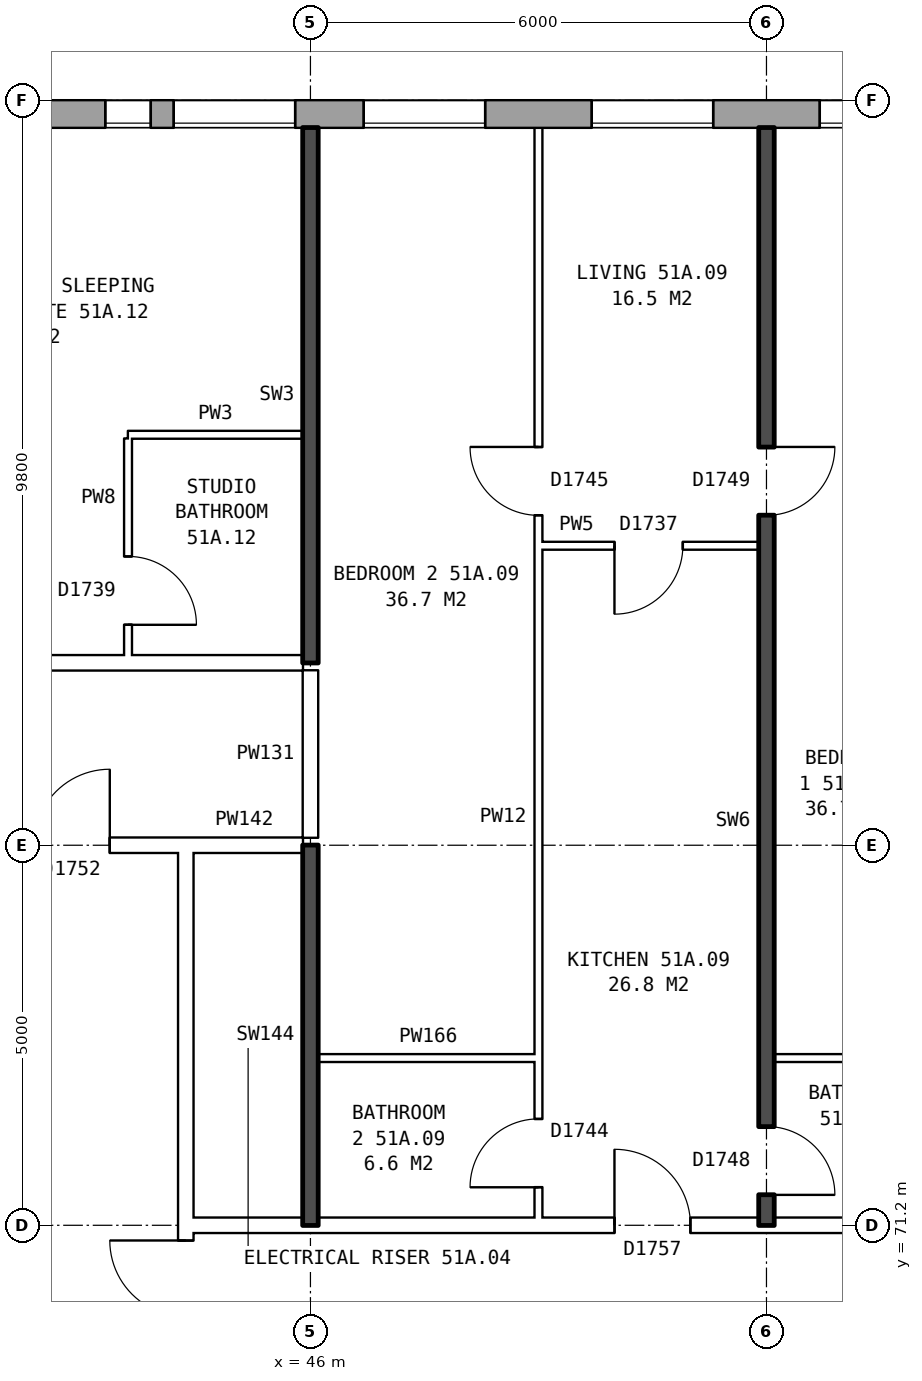
"""IFC4 building model, lengths in metres.
Left out: names, types, materials, properties, quantities, classifications, styles, units other than length and angle.
Written with IfcOpenShell. Run it as: python <this file> out.ifc"""

import sys

from ifc_helpers import new_model, si_unit, direction, frame, frame_2d, origin, place, context, subcontext, project, spatial, rectangle, extrude, element, fill, save


model = new_model("IFC4")
c1 = context("Model", 3, precision=1e-05, world=origin(), true_north=direction((0.0, 1.0)))
c2 = subcontext(c1, "Body", "Model", "MODEL_VIEW")
j1 = project(units=[si_unit("LENGTHUNIT", "METRE"), si_unit("PLANEANGLEUNIT", "RADIAN")], contexts=[c1])
p1 = place(None, origin())
s1 = spatial("IfcSite", under=j1, at=p1, CompositionType="ELEMENT")
p2 = place(p1, origin())
s2 = spatial("IfcBuilding", under=s1, at=p2, CompositionType="ELEMENT")
p3 = place(p2, frame((0.0, 0.0, 182.0)))
s3 = spatial("IfcBuildingStorey", under=s2, at=p3, CompositionType="ELEMENT", Elevation=182.0)
p4 = place(p3, frame((72.925, 85.82, 0.0), z_axis=(0.0, 0.0, 1.0), x_axis=(-1.0, 0.0, 0.0)))
e1 = element("IfcWall", 1, at=p4, inside=s3, PredefinedType="STANDARD", context=c2, shape_type="SweptSolid", body=[
    extrude(rectangle(XDim=39.601, YDim=0.36, at=frame_2d((19.8, 0.0))), origin(), (0.0, 0.0, 1.0), 2.85),
])
p5 = place(p4, frame((0.625, 0.0, 0.8)))
e2 = element("IfcOpeningElement", 2, at=p5, cuts=e1, PredefinedType="OPENING", context=c2, shape_type="SweptSolid", body=[
    extrude(rectangle(XDim=1.6, YDim=1.8, at=frame_2d((0.8, 0.9))), frame((0.0, 0.19, 0.0), z_axis=(0.0, -1.0, 0.0), x_axis=(1.0, 0.0, 0.0)), (0.0, 0.0, 1.0), 0.38),
])
p6 = place(p4, frame((3.625, 0.0, 0.8)))
e3 = element("IfcOpeningElement", 3, at=p6, cuts=e1, PredefinedType="OPENING", context=c2, shape_type="SweptSolid", body=[
    extrude(rectangle(XDim=1.6, YDim=1.8, at=frame_2d((0.8, 0.9))), frame((0.0, 0.19, 0.0), z_axis=(0.0, -1.0, 0.0), x_axis=(1.0, 0.0, 0.0)), (0.0, 0.0, 1.0), 0.38),
])
p7 = place(p4, frame((6.625, 0.0, 0.8)))
e4 = element("IfcOpeningElement", 4, at=p7, cuts=e1, PredefinedType="OPENING", context=c2, shape_type="SweptSolid", body=[
    extrude(rectangle(XDim=1.6, YDim=1.8, at=frame_2d((0.8, 0.9))), frame((0.0, 0.19, 0.0), z_axis=(0.0, -1.0, 0.0), x_axis=(1.0, 0.0, 0.0)), (0.0, 0.0, 1.0), 0.38),
])
p8 = place(p4, frame((9.475, 0.0, 0.35)))
e5 = element("IfcOpeningElement", 5, at=p8, cuts=e1, PredefinedType="OPENING", context=c2, shape_type="SweptSolid", body=[
    extrude(rectangle(XDim=0.6, YDim=0.9, at=frame_2d((0.3, 0.45))), frame((0.0, 0.19, 0.0), z_axis=(0.0, -1.0, 0.0), x_axis=(1.0, 0.0, 0.0)), (0.0, 0.0, 1.0), 0.38),
])
p9 = place(p4, frame((12.625, 0.0, 0.8)))
e6 = element("IfcOpeningElement", 6, at=p9, cuts=e1, PredefinedType="OPENING", context=c2, shape_type="SweptSolid", body=[
    extrude(rectangle(XDim=1.6, YDim=1.8, at=frame_2d((0.8, 0.9))), frame((0.0, 0.19, 0.0), z_axis=(0.0, -1.0, 0.0), x_axis=(1.0, 0.0, 0.0)), (0.0, 0.0, 1.0), 0.38),
])
p10 = place(p4, frame((15.625, 0.0, 0.8)))
e7 = element("IfcOpeningElement", 7, at=p10, cuts=e1, PredefinedType="OPENING", context=c2, shape_type="SweptSolid", body=[
    extrude(rectangle(XDim=1.6, YDim=1.8, at=frame_2d((0.8, 0.9))), frame((0.0, 0.19, 0.0), z_axis=(0.0, -1.0, 0.0), x_axis=(1.0, 0.0, 0.0)), (0.0, 0.0, 1.0), 0.38),
])
p11 = place(p4, frame((18.625, 0.0, 0.8)))
e8 = element("IfcOpeningElement", 8, at=p11, cuts=e1, PredefinedType="OPENING", context=c2, shape_type="SweptSolid", body=[
    extrude(rectangle(XDim=1.6, YDim=1.8, at=frame_2d((0.8, 0.9))), frame((0.0, 0.19, 0.0), z_axis=(0.0, -1.0, 0.0), x_axis=(1.0, 0.0, 0.0)), (0.0, 0.0, 1.0), 0.38),
])
p12 = place(p4, frame((21.625, 0.0, 0.8)))
e9 = element("IfcOpeningElement", 9, at=p12, cuts=e1, PredefinedType="OPENING", context=c2, shape_type="SweptSolid", body=[
    extrude(rectangle(XDim=1.6, YDim=1.8, at=frame_2d((0.8, 0.9))), frame((0.0, 0.19, 0.0), z_axis=(0.0, -1.0, 0.0), x_axis=(1.0, 0.0, 0.0)), (0.0, 0.0, 1.0), 0.38),
])
p13 = place(p4, frame((24.625, 0.0, 0.8)))
e10 = element("IfcOpeningElement", 10, at=p13, cuts=e1, PredefinedType="OPENING", context=c2, shape_type="SweptSolid", body=[
    extrude(rectangle(XDim=1.6, YDim=1.8, at=frame_2d((0.8, 0.9))), frame((0.0, 0.19, 0.0), z_axis=(0.0, -1.0, 0.0), x_axis=(1.0, 0.0, 0.0)), (0.0, 0.0, 1.0), 0.38),
])
p14 = place(p4, frame((27.125, 0.0, 0.8)))
e11 = element("IfcOpeningElement", 11, at=p14, cuts=e1, PredefinedType="OPENING", context=c2, shape_type="SweptSolid", body=[
    extrude(rectangle(XDim=1.6, YDim=1.8, at=frame_2d((0.8, 0.9))), frame((0.0, 0.19, 0.0), z_axis=(0.0, -1.0, 0.0), x_axis=(1.0, 0.0, 0.0)), (0.0, 0.0, 1.0), 0.38),
])
p15 = place(p4, frame((29.025, 0.0, 0.8)))
e12 = element("IfcOpeningElement", 12, at=p15, cuts=e1, PredefinedType="OPENING", context=c2, shape_type="SweptSolid", body=[
    extrude(rectangle(XDim=0.6, YDim=0.9, at=frame_2d((0.3, 0.45))), frame((0.0, 0.19, 0.0), z_axis=(0.0, -1.0, 0.0), x_axis=(1.0, 0.0, 0.0)), (0.0, 0.0, 1.0), 0.38),
])
p16 = place(p4, frame((33.625, 0.0, 0.8)))
e13 = element("IfcOpeningElement", 13, at=p16, cuts=e1, PredefinedType="OPENING", context=c2, shape_type="SweptSolid", body=[
    extrude(rectangle(XDim=1.6, YDim=1.8, at=frame_2d((0.8, 0.9))), frame((0.0, 0.19, 0.0), z_axis=(0.0, -1.0, 0.0), x_axis=(1.0, 0.0, 0.0)), (0.0, 0.0, 1.0), 0.38),
])
p17 = place(p4, frame((36.625, 0.0, 0.8)))
e14 = element("IfcOpeningElement", 14, at=p17, cuts=e1, PredefinedType="OPENING", context=c2, shape_type="SweptSolid", body=[
    extrude(rectangle(XDim=1.6, YDim=1.8, at=frame_2d((0.8, 0.9))), frame((0.0, 0.19, 0.0), z_axis=(0.0, -1.0, 0.0), x_axis=(1.0, 0.0, 0.0)), (0.0, 0.0, 1.0), 0.38),
])
p18 = place(p4, frame((10.375, 0.0, 0.35)))
e15 = element("IfcOpeningElement", 15, at=p18, cuts=e1, PredefinedType="OPENING", context=c2, shape_type="SweptSolid", body=[
    extrude(rectangle(XDim=1.4, YDim=1.8, at=frame_2d((0.7, 0.9))), frame((0.0, 0.19, 0.0), z_axis=(0.0, -1.0, 0.0), x_axis=(1.0, 0.0, 0.0)), (0.0, 0.0, 1.0), 0.38),
])
p19 = place(p4, frame((30.775, 0.0, 1.7)))
e16 = element("IfcOpeningElement", 16, at=p19, cuts=e1, PredefinedType="OPENING", context=c2, shape_type="SweptSolid", body=[
    extrude(rectangle(XDim=0.6, YDim=0.9, at=frame_2d((0.3, 0.45))), frame((0.0, 0.19, 0.0), z_axis=(0.0, -1.0, 0.0), x_axis=(1.0, 0.0, 0.0)), (0.0, 0.0, 1.0), 0.38),
])
p20 = place(p4, frame((31.675, 0.0, 0.8)))
e17 = element("IfcOpeningElement", 17, at=p20, cuts=e1, PredefinedType="OPENING", context=c2, shape_type="SweptSolid", body=[
    extrude(rectangle(XDim=1.0, YDim=1.8, at=frame_2d((0.5, 0.9))), frame((0.0, 0.19, 0.0), z_axis=(0.0, -1.0, 0.0), x_axis=(1.0, 0.0, 0.0)), (0.0, 0.0, 1.0), 0.38),
])
p21 = place(p3, frame((44.36, 63.9, 0.0), z_axis=(0.0, 0.0, 1.0), x_axis=(0.0, 1.0, 0.0)))
e18 = element("IfcWall", 18, at=p21, inside=s3, PredefinedType="PARTITIONING", context=c2, shape_type="SweptSolid", body=[
    extrude(rectangle(XDim=12.2, YDim=0.2, at=frame_2d((6.1, 0.0))), origin(), (0.0, 0.0, 1.0), 2.85),
])
p22 = place(p21, frame((5.1, 0.0, 0.0)))
e19 = element("IfcOpeningElement", 19, at=p22, cuts=e18, PredefinedType="OPENING", context=c2, shape_type="SweptSolid", body=[
    extrude(rectangle(XDim=2.0, YDim=2.1, at=frame_2d((1.0, 1.05))), frame((0.0, 0.11, 0.0), z_axis=(0.0, -1.0, 0.0), x_axis=(1.0, 0.0, 0.0)), (0.0, 0.0, 1.0), 0.22),
])
p23 = place(p3, frame((44.36, 71.2, 0.0), z_axis=(0.0, 0.0, 1.0), x_axis=(1.0, 0.0, 0.0)))
e20 = element("IfcWall", 20, at=p23, inside=s3, PredefinedType="PARTITIONING", context=c2, shape_type="SweptSolid", body=[
    extrude(rectangle(XDim=19.28, YDim=0.2, at=frame_2d((9.64, 0.0))), origin(), (0.0, 0.0, 1.0), 2.85),
])
p24 = place(p23, frame((14.64, 0.0, 0.0)))
e21 = element("IfcOpeningElement", 21, at=p24, cuts=e20, PredefinedType="OPENING", context=c2, shape_type="SweptSolid", body=[
    extrude(rectangle(XDim=1.0, YDim=2.1, at=frame_2d((0.5, 1.05))), frame((0.0, 0.11, 0.0), z_axis=(0.0, -1.0, 0.0), x_axis=(1.0, 0.0, 0.0)), (0.0, 0.0, 1.0), 0.22),
])
p25 = place(p23, frame((5.64, 0.0, 0.0)))
e22 = element("IfcOpeningElement", 22, at=p25, cuts=e20, PredefinedType="OPENING", context=c2, shape_type="SweptSolid", body=[
    extrude(rectangle(XDim=1.0, YDim=2.1, at=frame_2d((0.5, 1.05))), frame((0.0, 0.11, 0.0), z_axis=(0.0, -1.0, 0.0), x_axis=(1.0, 0.0, 0.0)), (0.0, 0.0, 1.0), 0.22),
])
p26 = place(p3, frame((46.1, 73.4, 0.0), z_axis=(0.0, 0.0, 1.0), x_axis=(1.0, 0.0, 0.0)))
e23 = element("IfcWall", 23, at=p26, inside=s3, PredefinedType="PARTITIONING", context=c2, shape_type="SweptSolid", body=[
    extrude(rectangle(XDim=2.9, YDim=0.1, at=frame_2d((1.45, 0.0))), origin(), (0.0, 0.0, 1.0), 2.85),
])
p27 = place(p3, frame((52.1, 73.4, 0.0), z_axis=(0.0, 0.0, 1.0), x_axis=(1.0, 0.0, 0.0)))
e24 = element("IfcWall", 24, at=p27, inside=s3, PredefinedType="PARTITIONING", context=c2, shape_type="SweptSolid", body=[
    extrude(rectangle(XDim=2.8, YDim=0.1, at=frame_2d((1.4, 0.0))), origin(), (0.0, 0.0, 1.0), 2.85),
])
p28 = place(p3, frame((41.36, 76.2, 0.0), z_axis=(0.0, 0.0, 1.0), x_axis=(1.0, 0.0, 0.0)))
e25 = element("IfcWall", 25, at=p28, inside=s3, PredefinedType="PARTITIONING", context=c2, shape_type="SweptSolid", body=[
    extrude(rectangle(XDim=3.0, YDim=0.2, at=frame_2d((1.5, 0.0))), origin(), (0.0, 0.0, 1.0), 2.85),
])
p29 = place(p28, frame((1.0, 0.0, 0.0)))
e26 = element("IfcOpeningElement", 26, at=p29, cuts=e25, PredefinedType="OPENING", context=c2, shape_type="SweptSolid", body=[
    extrude(rectangle(XDim=1.0, YDim=2.1, at=frame_2d((0.5, 1.05))), frame((0.0, 0.11, 0.0), z_axis=(0.0, -1.0, 0.0), x_axis=(1.0, 0.0, 0.0)), (0.0, 0.0, 1.0), 0.22),
])
p30 = place(p3, frame((44.36, 76.2, 0.0), z_axis=(0.0, 0.0, 1.0), x_axis=(1.0, 0.0, 0.0)))
e27 = element("IfcWall", 27, at=p30, inside=s3, PredefinedType="PARTITIONING", context=c2, shape_type="SweptSolid", body=[
    extrude(rectangle(XDim=1.54, YDim=0.2, at=frame_2d((0.77, 0.0))), origin(), (0.0, 0.0, 1.0), 2.85),
])
p31 = place(p3, frame((30.61, 78.6, 0.0), z_axis=(0.0, 0.0, 1.0), x_axis=(1.0, 0.0, 0.0)))
e28 = element("IfcWall", 28, at=p31, inside=s3, PredefinedType="PARTITIONING", context=c2, shape_type="SweptSolid", body=[
    extrude(rectangle(XDim=15.29, YDim=0.2, at=frame_2d((7.645, 0.0))), origin(), (0.0, 0.0, 1.0), 2.85),
])
p32 = place(p31, frame((10.69, 0.0, 0.0)))
e29 = element("IfcOpeningElement", 29, at=p32, cuts=e28, PredefinedType="OPENING", context=c2, shape_type="SweptSolid", body=[
    extrude(rectangle(XDim=1.0, YDim=2.1, at=frame_2d((0.5, 1.05))), frame((0.0, 0.11, 0.0), z_axis=(0.0, -1.0, 0.0), x_axis=(1.0, 0.0, 0.0)), (0.0, 0.0, 1.0), 0.22),
])
p33 = place(p31, frame((5.89, 0.0, 0.0)))
e30 = element("IfcOpeningElement", 30, at=p33, cuts=e28, PredefinedType="OPENING", context=c2, shape_type="SweptSolid", body=[
    extrude(rectangle(XDim=1.0, YDim=2.1, at=frame_2d((0.5, 1.05))), frame((0.0, 0.11, 0.0), z_axis=(0.0, -1.0, 0.0), x_axis=(1.0, 0.0, 0.0)), (0.0, 0.0, 1.0), 0.22),
])
p34 = place(p3, frame((49.0, 80.14, 0.0), z_axis=(0.0, 0.0, 1.0), x_axis=(1.0, 0.0, 0.0)))
e31 = element("IfcWall", 31, at=p34, inside=s3, PredefinedType="PARTITIONING", context=c2, shape_type="SweptSolid", body=[
    extrude(rectangle(XDim=2.9, YDim=0.1, at=frame_2d((1.45, 0.0))), origin(), (0.0, 0.0, 1.0), 2.85),
])
p35 = place(p34, frame((1.0, 0.0, 0.0)))
e32 = element("IfcOpeningElement", 32, at=p35, cuts=e31, PredefinedType="OPENING", context=c2, shape_type="SweptSolid", body=[
    extrude(rectangle(XDim=0.9, YDim=2.1, at=frame_2d((0.45, 1.05))), frame((0.0, 0.06, 0.0), z_axis=(0.0, -1.0, 0.0), x_axis=(1.0, 0.0, 0.0)), (0.0, 0.0, 1.0), 0.12),
])
p36 = place(p3, frame((43.6, 81.6, 0.0), z_axis=(0.0, 0.0, 1.0), x_axis=(1.0, 0.0, 0.0)))
e33 = element("IfcWall", 33, at=p36, inside=s3, PredefinedType="PARTITIONING", context=c2, shape_type="SweptSolid", body=[
    extrude(rectangle(XDim=2.3, YDim=0.1, at=frame_2d((1.15, 0.0))), origin(), (0.0, 0.0, 1.0), 2.85),
])
p37 = place(p3, frame((43.6, 78.7, 0.0), z_axis=(0.0, 0.0, 1.0), x_axis=(0.0, 1.0, 0.0)))
e34 = element("IfcWall", 34, at=p37, inside=s3, PredefinedType="PARTITIONING", context=c2, shape_type="SweptSolid", body=[
    extrude(rectangle(XDim=2.85, YDim=0.1, at=frame_2d((1.425, 0.0))), origin(), (0.0, 0.0, 1.0), 2.85),
])
p38 = place(p37, frame((0.4, 0.0, 0.0)))
e35 = element("IfcOpeningElement", 35, at=p38, cuts=e34, PredefinedType="OPENING", context=c2, shape_type="SweptSolid", body=[
    extrude(rectangle(XDim=0.9, YDim=2.1, at=frame_2d((0.45, 1.05))), frame((0.0, 0.06, 0.0), z_axis=(0.0, -1.0, 0.0), x_axis=(1.0, 0.0, 0.0)), (0.0, 0.0, 1.0), 0.12),
])
p39 = place(p3, frame((46.0, 71.2, 0.0), z_axis=(0.0, 0.0, 1.0), x_axis=(0.0, 1.0, 0.0)))
e36 = element("IfcWall", 36, at=p39, inside=s3, PredefinedType="SOLIDWALL", context=c2, shape_type="SweptSolid", body=[
    extrude(rectangle(XDim=5.0, YDim=0.2, at=frame_2d((2.5, 0.0))), origin(), (0.0, 0.0, 1.0), 2.85),
])
p40 = place(p3, frame((46.0, 76.3, 0.0), z_axis=(0.0, 0.0, 1.0), x_axis=(0.0, 1.0, 0.0)))
e37 = element("IfcWall", 37, at=p40, inside=s3, PredefinedType="PARTITIONING", context=c2, shape_type="SweptSolid", body=[
    extrude(rectangle(XDim=2.2, YDim=0.2, at=frame_2d((1.1, 0.0))), origin(), (0.0, 0.0, 1.0), 2.85),
])
p41 = place(p3, frame((46.0, 78.6, 0.0), z_axis=(0.0, 0.0, 1.0), x_axis=(0.0, 1.0, 0.0)))
e38 = element("IfcWall", 38, at=p41, inside=s3, PredefinedType="SOLIDWALL", context=c2, shape_type="SweptSolid", body=[
    extrude(rectangle(XDim=7.04, YDim=0.2, at=frame_2d((3.52, 0.0))), origin(), (0.0, 0.0, 1.0), 2.85),
])
p42 = place(p3, frame((49.0, 71.3, 0.0), z_axis=(0.0, 0.0, 1.0), x_axis=(0.0, 1.0, 0.0)))
e39 = element("IfcWall", 39, at=p42, inside=s3, PredefinedType="PARTITIONING", context=c2, shape_type="SweptSolid", body=[
    extrude(rectangle(XDim=14.34, YDim=0.1, at=frame_2d((7.17, 0.0))), origin(), (0.0, 0.0, 1.0), 2.85),
])
p43 = place(p42, frame((9.24, 0.0, 0.0)))
e40 = element("IfcOpeningElement", 40, at=p43, cuts=e39, PredefinedType="OPENING", context=c2, shape_type="SweptSolid", body=[
    extrude(rectangle(XDim=0.9, YDim=2.1, at=frame_2d((0.45, 1.05))), frame((0.0, 0.06, 0.0), z_axis=(0.0, -1.0, 0.0), x_axis=(1.0, 0.0, 0.0)), (0.0, 0.0, 1.0), 0.12),
])
p44 = place(p42, frame((0.4, 0.0, 0.0)))
e41 = element("IfcOpeningElement", 41, at=p44, cuts=e39, PredefinedType="OPENING", context=c2, shape_type="SweptSolid", body=[
    extrude(rectangle(XDim=0.9, YDim=2.1, at=frame_2d((0.45, 1.05))), frame((0.0, 0.06, 0.0), z_axis=(0.0, -1.0, 0.0), x_axis=(1.0, 0.0, 0.0)), (0.0, 0.0, 1.0), 0.12),
])
p45 = place(p3, frame((52.0, 71.2, 0.0), z_axis=(0.0, 0.0, 1.0), x_axis=(0.0, 1.0, 0.0)))
e42 = element("IfcWall", 42, at=p45, inside=s3, PredefinedType="SOLIDWALL", context=c2, shape_type="SweptSolid", body=[
    extrude(rectangle(XDim=14.44, YDim=0.2, at=frame_2d((7.22, 0.0))), origin(), (0.0, 0.0, 1.0), 2.85),
])
p46 = place(p45, frame((9.34, 0.0, 0.0)))
e43 = element("IfcOpeningElement", 43, at=p46, cuts=e42, PredefinedType="OPENING", context=c2, shape_type="SweptSolid", body=[
    extrude(rectangle(XDim=0.9, YDim=2.1, at=frame_2d((0.45, 1.05))), frame((0.0, 0.11, 0.0), z_axis=(0.0, -1.0, 0.0), x_axis=(1.0, 0.0, 0.0)), (0.0, 0.0, 1.0), 0.22),
])
p47 = place(p45, frame((0.4, 0.0, 0.0)))
e44 = element("IfcOpeningElement", 44, at=p47, cuts=e42, PredefinedType="OPENING", context=c2, shape_type="SweptSolid", body=[
    extrude(rectangle(XDim=0.9, YDim=2.1, at=frame_2d((0.45, 1.05))), frame((0.0, 0.11, 0.0), z_axis=(0.0, -1.0, 0.0), x_axis=(1.0, 0.0, 0.0)), (0.0, 0.0, 1.0), 0.22),
])
p48 = place(p11, origin())
e45 = element("IfcWindow", 45, at=p48, inside=s3, PartitioningType="SINGLE_PANEL", PredefinedType="WINDOW", context=c2, shape_type="SweptSolid", body=[
    extrude(rectangle(XDim=1.6, YDim=1.8, at=frame_2d((0.8, 0.9))), frame((0.0, 0.15, 0.0), z_axis=(0.0, -1.0, 0.0), x_axis=(1.0, 0.0, 0.0)), (0.0, 0.0, 1.0), 0.06),
])
fill(e8, e45)
p49 = place(p12, origin())
e46 = element("IfcWindow", 46, at=p49, inside=s3, PartitioningType="SINGLE_PANEL", PredefinedType="WINDOW", context=c2, shape_type="SweptSolid", body=[
    extrude(rectangle(XDim=1.6, YDim=1.8, at=frame_2d((0.8, 0.9))), frame((0.0, 0.15, 0.0), z_axis=(0.0, -1.0, 0.0), x_axis=(1.0, 0.0, 0.0)), (0.0, 0.0, 1.0), 0.06),
])
fill(e9, e46)
p50 = place(p13, origin())
e47 = element("IfcWindow", 47, at=p50, inside=s3, PartitioningType="SINGLE_PANEL", PredefinedType="WINDOW", context=c2, shape_type="SweptSolid", body=[
    extrude(rectangle(XDim=1.6, YDim=1.8, at=frame_2d((0.8, 0.9))), frame((0.0, 0.15, 0.0), z_axis=(0.0, -1.0, 0.0), x_axis=(1.0, 0.0, 0.0)), (0.0, 0.0, 1.0), 0.06),
])
fill(e10, e47)
p51 = place(p14, origin())
e48 = element("IfcWindow", 48, at=p51, inside=s3, PartitioningType="SINGLE_PANEL", PredefinedType="WINDOW", context=c2, shape_type="SweptSolid", body=[
    extrude(rectangle(XDim=1.6, YDim=1.8, at=frame_2d((0.8, 0.9))), frame((0.0, 0.15, 0.0), z_axis=(0.0, -1.0, 0.0), x_axis=(1.0, 0.0, 0.0)), (0.0, 0.0, 1.0), 0.06),
])
fill(e11, e48)
p52 = place(p15, origin())
e49 = element("IfcWindow", 49, at=p52, inside=s3, PartitioningType="SINGLE_PANEL", PredefinedType="WINDOW", context=c2, shape_type="SweptSolid", body=[
    extrude(rectangle(XDim=0.6, YDim=0.9, at=frame_2d((0.3, 0.45))), frame((0.0, 0.15, 0.0), z_axis=(0.0, -1.0, 0.0), x_axis=(1.0, 0.0, 0.0)), (0.0, 0.0, 1.0), 0.06),
])
fill(e12, e49)
p53 = place(p22, origin())
e50 = element("IfcDoor", 50, at=p53, inside=s3, OperationType="DOUBLE_DOOR_SINGLE_SWING", PredefinedType="DOOR", context=c2, shape_type="SweptSolid", body=[
    extrude(rectangle(XDim=2.0, YDim=2.1, at=frame_2d((1.0, 1.05))), frame((0.0, 0.025, 0.0), z_axis=(0.0, -1.0, 0.0), x_axis=(1.0, 0.0, 0.0)), (0.0, 0.0, 1.0), 0.05),
])
fill(e19, e50)
p54 = place(p29, origin())
e51 = element("IfcDoor", 51, at=p54, inside=s3, OperationType="SINGLE_SWING_RIGHT", PredefinedType="DOOR", context=c2, shape_type="SweptSolid", body=[
    extrude(rectangle(XDim=1.0, YDim=2.1, at=frame_2d((0.5, 1.05))), frame((0.0, 0.025, 0.0), z_axis=(0.0, -1.0, 0.0), x_axis=(1.0, 0.0, 0.0)), (0.0, 0.0, 1.0), 0.05),
])
fill(e26, e51)
p55 = place(p46, frame((0.9, 0.0, 0.0), z_axis=(0.0, 0.0, 1.0), x_axis=(-1.0, 0.0, 0.0)))
e52 = element("IfcDoor", 52, at=p55, inside=s3, OperationType="SINGLE_SWING_LEFT", PredefinedType="DOOR", context=c2, shape_type="SweptSolid", body=[
    extrude(rectangle(XDim=0.9, YDim=2.1, at=frame_2d((0.45, 1.05))), frame((0.0, 0.025, 0.0), z_axis=(0.0, -1.0, 0.0), x_axis=(1.0, 0.0, 0.0)), (0.0, 0.0, 1.0), 0.05),
])
fill(e43, e52)
p56 = place(p43, origin())
e53 = element("IfcDoor", 53, at=p56, inside=s3, OperationType="SINGLE_SWING_RIGHT", PredefinedType="DOOR", context=c2, shape_type="SweptSolid", body=[
    extrude(rectangle(XDim=0.9, YDim=2.1, at=frame_2d((0.45, 1.05))), frame((0.0, 0.025, 0.0), z_axis=(0.0, -1.0, 0.0), x_axis=(1.0, 0.0, 0.0)), (0.0, 0.0, 1.0), 0.05),
])
fill(e40, e53)
p57 = place(p25, origin())
e54 = element("IfcDoor", 54, at=p57, inside=s3, OperationType="SINGLE_SWING_LEFT", PredefinedType="DOOR", context=c2, shape_type="SweptSolid", body=[
    extrude(rectangle(XDim=1.0, YDim=2.1, at=frame_2d((0.5, 1.05))), frame((0.0, 0.025, 0.0), z_axis=(0.0, -1.0, 0.0), x_axis=(1.0, 0.0, 0.0)), (0.0, 0.0, 1.0), 0.05),
])
fill(e22, e54)
p58 = place(p35, frame((0.9, 0.0, 0.0), z_axis=(0.0, 0.0, 1.0), x_axis=(-1.0, 0.0, 0.0)))
e55 = element("IfcDoor", 55, at=p58, inside=s3, OperationType="SINGLE_SWING_RIGHT", PredefinedType="DOOR", context=c2, shape_type="SweptSolid", body=[
    extrude(rectangle(XDim=0.9, YDim=2.1, at=frame_2d((0.45, 1.05))), frame((0.0, 0.025, 0.0), z_axis=(0.0, -1.0, 0.0), x_axis=(1.0, 0.0, 0.0)), (0.0, 0.0, 1.0), 0.05),
])
fill(e32, e55)
p59 = place(p47, frame((0.9, 0.0, 0.0), z_axis=(0.0, 0.0, 1.0), x_axis=(-1.0, 0.0, 0.0)))
e56 = element("IfcDoor", 56, at=p59, inside=s3, OperationType="SINGLE_SWING_RIGHT", PredefinedType="DOOR", context=c2, shape_type="SweptSolid", body=[
    extrude(rectangle(XDim=0.9, YDim=2.1, at=frame_2d((0.45, 1.05))), frame((0.0, 0.025, 0.0), z_axis=(0.0, -1.0, 0.0), x_axis=(1.0, 0.0, 0.0)), (0.0, 0.0, 1.0), 0.05),
])
fill(e44, e56)
p60 = place(p44, origin())
e57 = element("IfcDoor", 57, at=p60, inside=s3, OperationType="SINGLE_SWING_LEFT", PredefinedType="DOOR", context=c2, shape_type="SweptSolid", body=[
    extrude(rectangle(XDim=0.9, YDim=2.1, at=frame_2d((0.45, 1.05))), frame((0.0, 0.025, 0.0), z_axis=(0.0, -1.0, 0.0), x_axis=(1.0, 0.0, 0.0)), (0.0, 0.0, 1.0), 0.05),
])
fill(e41, e57)
p61 = place(p38, frame((0.9, 0.0, 0.0), z_axis=(0.0, 0.0, 1.0), x_axis=(-1.0, 0.0, 0.0)))
e58 = element("IfcDoor", 58, at=p61, inside=s3, OperationType="SINGLE_SWING_RIGHT", PredefinedType="DOOR", context=c2, shape_type="SweptSolid", body=[
    extrude(rectangle(XDim=0.9, YDim=2.1, at=frame_2d((0.45, 1.05))), frame((0.0, 0.025, 0.0), z_axis=(0.0, -1.0, 0.0), x_axis=(1.0, 0.0, 0.0)), (0.0, 0.0, 1.0), 0.05),
])
fill(e35, e58)
save(model, sys.argv[1])
